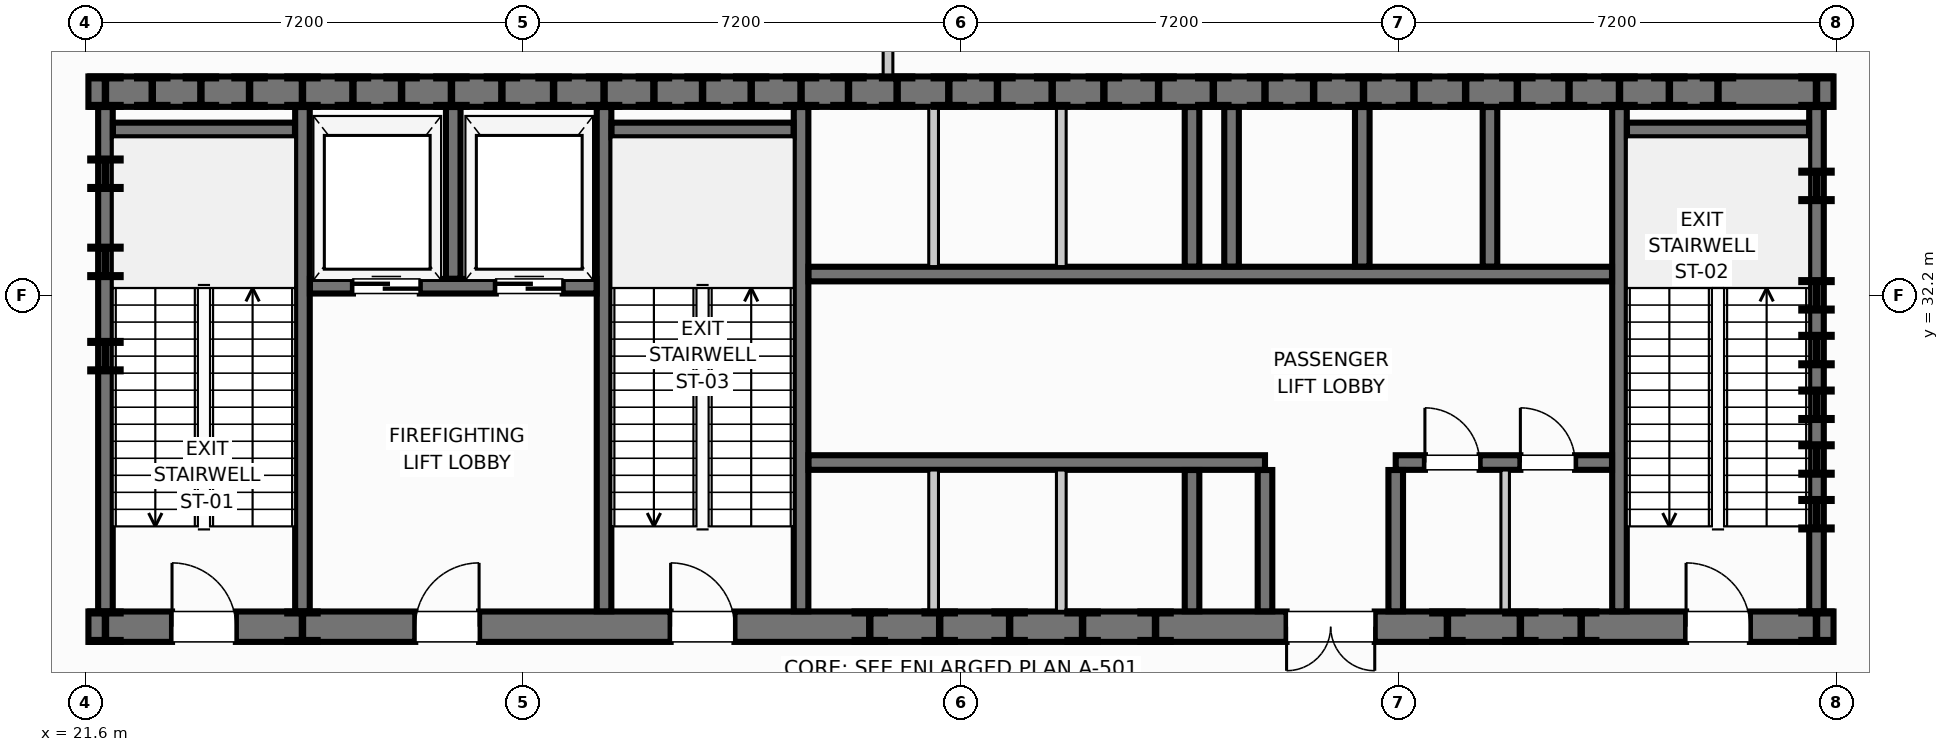
"""IFC4 building model, lengths in metres.
Left out: names, types, materials, properties, quantities, classifications, styles, units other than length and angle.
Written with IfcOpenShell. Run it as: python <this file> out.ifc"""

import sys

from ifc_helpers import new_model, si_unit, direction, frame, frame_2d, origin, origin_2d, place, context, subcontext, project, spatial, rectangle, i_section, extrude, element, fill, save


model = new_model("IFC4")
c1 = context("Model", 3, precision=1e-05, world=origin(), true_north=direction((0.0, 1.0)))
c2 = subcontext(c1, "Body", "Model", "MODEL_VIEW")
j1 = project(units=[si_unit("LENGTHUNIT", "METRE"), si_unit("PLANEANGLEUNIT", "RADIAN")], contexts=[c1])
p1 = place(None, origin())
s1 = spatial("IfcSite", under=j1, at=p1, CompositionType="ELEMENT")
p2 = place(p1, origin())
s2 = spatial("IfcBuilding", under=s1, at=p2, CompositionType="ELEMENT")
p3 = place(p2, frame((0.0, 0.0, -5.4)))
s3 = spatial("IfcBuildingStorey", under=s2, at=p3, CompositionType="ELEMENT", Elevation=-5.4)
for number, where, z_axis, x_axis in (
    (1, (21.93, 35.55, 0.0), (0.0, 0.0, 1.0), (1.0, 0.0, 0.0)),
    (2, (23.5, 35.55, 0.0), (0.0, 0.0, 1.0), (1.0, 0.0, 0.0)),
    (3, (25.17, 35.55, 0.0), (0.0, 0.0, 1.0), (1.0, 0.0, 0.0)),
    (4, (26.8, 35.55, 0.0), (0.0, 0.0, 1.0), (1.0, 0.0, 0.0)),
    (5, (28.45, 35.55, 0.0), (0.0, 0.0, 1.0), (1.0, 0.0, 0.0)),
    (6, (30.13, 35.55, 0.0), (0.0, 0.0, 1.0), (1.0, 0.0, 0.0)),
    (7, (31.75, 35.55, 0.0), (0.0, 0.0, 1.0), (1.0, 0.0, 0.0)),
    (8, (33.37, 35.55, 0.0), (0.0, 0.0, 1.0), (1.0, 0.0, 0.0)),
    (9, (34.95, 35.55, 0.0), (0.0, 0.0, 1.0), (1.0, 0.0, 0.0)),
    (10, (36.6, 35.55, 0.0), (0.0, 0.0, 1.0), (1.0, 0.0, 0.0)),
    (11, (38.35, 35.55, 0.0), (0.0, 0.0, 1.0), (1.0, 0.0, 0.0)),
    (12, (40.15, 35.55, 0.0), (0.0, 0.0, 1.0), (1.0, 0.0, 0.0)),
    (13, (41.8, 35.55, 0.0), (0.0, 0.0, 1.0), (1.0, 0.0, 0.0)),
    (14, (43.45, 35.55, 0.0), (0.0, 0.0, 1.0), (1.0, 0.0, 0.0)),
    (15, (45.15, 35.55, 0.0), (0.0, 0.0, 1.0), (1.0, 0.0, 0.0)),
    (16, (46.83, 35.55, 0.0), (0.0, 0.0, 1.0), (1.0, 0.0, 0.0)),
    (17, (48.45, 35.55, 0.0), (0.0, 0.0, 1.0), (1.0, 0.0, 0.0)),
    (18, (50.07, 35.55, 0.0), (0.0, 0.0, 1.0), (1.0, 0.0, 0.0)),
    (19, (21.93, 26.75, 0.0), (0.0, 0.0, 1.0), (1.0, 0.0, 0.0)),
    (20, (25.17, 26.75, 0.0), (0.0, 0.0, 1.0), (1.0, 0.0, 0.0)),
    (21, (34.5, 26.75, 0.0), (0.0, 0.0, 1.0), (1.0, 0.0, 0.0)),
    (22, (36.8, 26.75, 0.0), (0.0, 0.0, 1.0), (1.0, 0.0, 0.0)),
    (23, (39.2, 26.75, 0.0), (0.0, 0.0, 1.0), (1.0, 0.0, 0.0)),
    (24, (45.2, 26.75, 0.0), (0.0, 0.0, 1.0), (1.0, 0.0, 0.0)),
    (25, (50.07, 26.75, 0.0), (0.0, 0.0, 1.0), (1.0, 0.0, 0.0)),
    (26, (21.93, 31.2, 0.0), (0.0, 0.0, 1.0), (1.0, 0.0, 0.0)),
    (27, (21.93, 32.75, 0.0), (0.0, 0.0, 1.0), (1.0, 0.0, 0.0)),
    (28, (21.93, 34.2, 0.0), (0.0, 0.0, 1.0), (1.0, 0.0, 0.0)),
    (29, (50.07, 28.6, 0.0), (0.0, 0.0, 1.0), (1.0, 0.0, 0.0)),
    (30, (50.07, 30.4, 0.0), (0.0, 0.0, 1.0), (1.0, 0.0, 0.0)),
    (31, (50.07, 32.2, 0.0), (0.0, 0.0, 1.0), (1.0, 0.0, 0.0)),
    (32, (50.07, 34.0, 0.0), (0.0, 0.0, 1.0), (1.0, 0.0, 0.0)),
    (33, (22.7, 35.55, 0.0), (0.0, 0.0, 1.0), (1.0, 0.0, 0.0)),
    (34, (27.62, 35.55, 0.0), (0.0, 0.0, 1.0), (1.0, 0.0, 0.0)),
    (35, (32.55, 35.55, 0.0), (0.0, 0.0, 1.0), (1.0, 0.0, 0.0)),
    (36, (37.5, 35.55, 0.0), (0.0, 0.0, 1.0), (1.0, 0.0, 0.0)),
    (37, (42.62, 35.55, 0.0), (0.0, 0.0, 1.0), (1.0, 0.0, 0.0)),
    (38, (47.65, 35.55, 0.0), (0.0, 0.0, 1.0), (1.0, 0.0, 0.0)),
    (39, (24.3, 35.55, 0.0), (0.0, 0.0, 1.0), (1.0, 0.0, 0.0)),
    (40, (26.0, 35.55, 0.0), (0.0, 0.0, 1.0), (1.0, 0.0, 0.0)),
    (41, (29.3, 35.55, 0.0), (0.0, 0.0, 1.0), (1.0, 0.0, 0.0)),
    (42, (30.95, 35.55, 0.0), (0.0, 0.0, 1.0), (1.0, 0.0, 0.0)),
    (43, (34.15, 35.55, 0.0), (0.0, 0.0, 1.0), (1.0, 0.0, 0.0)),
    (44, (35.8, 35.55, 0.0), (0.0, 0.0, 1.0), (1.0, 0.0, 0.0)),
    (45, (39.25, 35.55, 0.0), (0.0, 0.0, 1.0), (1.0, 0.0, 0.0)),
    (46, (41.0, 35.55, 0.0), (0.0, 0.0, 1.0), (1.0, 0.0, 0.0)),
    (47, (44.3, 35.55, 0.0), (0.0, 0.0, 1.0), (1.0, 0.0, 0.0)),
    (48, (46.0, 35.55, 0.0), (0.0, 0.0, 1.0), (1.0, 0.0, 0.0)),
    (49, (50.07, 29.5, 0.0), (0.0, 0.0, 1.0), (1.0, 0.0, 0.0)),
    (50, (50.07, 31.3, 0.0), (0.0, 0.0, 1.0), (1.0, 0.0, 0.0)),
    (51, (35.65, 26.75, 0.0), (0.0, 0.0, 1.0), (1.0, 0.0, 0.0)),
    (52, (38.0, 26.75, 0.0), (0.0, 0.0, 1.0), (1.0, 0.0, 0.0)),
    (53, (44.0, 26.75, 0.0), (0.0, 0.0, 1.0), (1.0, 0.0, 0.0)),
    (54, (46.2, 26.75, 0.0), (0.0, 0.0, 1.0), (1.0, 0.0, 0.0)),
):
    element("IfcColumn", number, at=place(p3, frame(where, z_axis=z_axis, x_axis=x_axis)), inside=s3, PredefinedType="COLUMN", context=c2, shape_type="SweptSolid", body=[
        extrude(i_section(OverallWidth=0.5, OverallDepth=0.5, WebThickness=0.022, FlangeThickness=0.032, at=origin_2d()), origin(), (0.0, 0.0, 1.0), 5.4),
    ])
p4 = place(p3, frame((21.65, 26.75, 0.0), z_axis=(0.0, 0.0, 1.0), x_axis=(1.0, 0.0, 0.0)))
e55 = element("IfcWall", 55, at=p4, inside=s3, PredefinedType="SHEAR", context=c2, shape_type="SweptSolid", body=[
    extrude(rectangle(XDim=28.7, YDim=0.5, at=frame_2d((14.35, 0.0))), origin(), (0.0, 0.0, 1.0), 5.4),
])
p5 = place(p4, frame((1.375, 0.0, 0.0)))
e56 = element("IfcOpeningElement", 56, at=p5, cuts=e55, PredefinedType="OPENING", context=c2, shape_type="SweptSolid", body=[
    extrude(rectangle(XDim=1.05, YDim=2.0, at=frame_2d((0.525, 1.0))), frame((0.0, 0.26, 0.0), z_axis=(0.0, -1.0, 0.0), x_axis=(1.0, 0.0, 0.0)), (0.0, 0.0, 1.0), 0.52),
])
p6 = place(p4, frame((5.375, 0.0, 0.0)))
e57 = element("IfcOpeningElement", 57, at=p6, cuts=e55, PredefinedType="OPENING", context=c2, shape_type="SweptSolid", body=[
    extrude(rectangle(XDim=1.05, YDim=2.0, at=frame_2d((0.525, 1.0))), frame((0.0, 0.26, 0.0), z_axis=(0.0, -1.0, 0.0), x_axis=(1.0, 0.0, 0.0)), (0.0, 0.0, 1.0), 0.52),
])
p7 = place(p4, frame((9.575, 0.0, 0.0)))
e58 = element("IfcOpeningElement", 58, at=p7, cuts=e55, PredefinedType="OPENING", context=c2, shape_type="SweptSolid", body=[
    extrude(rectangle(XDim=1.05, YDim=2.0, at=frame_2d((0.525, 1.0))), frame((0.0, 0.26, 0.0), z_axis=(0.0, -1.0, 0.0), x_axis=(1.0, 0.0, 0.0)), (0.0, 0.0, 1.0), 0.52),
])
p8 = place(p4, frame((19.705, 0.0, 0.0)))
e59 = element("IfcOpeningElement", 59, at=p8, cuts=e55, PredefinedType="OPENING", context=c2, shape_type="SweptSolid", body=[
    extrude(rectangle(XDim=1.45, YDim=2.0, at=frame_2d((0.725, 1.0))), frame((0.0, 0.26, 0.0), z_axis=(0.0, -1.0, 0.0), x_axis=(1.0, 0.0, 0.0)), (0.0, 0.0, 1.0), 0.52),
])
p9 = place(p4, frame((26.275, 0.0, 0.0)))
e60 = element("IfcOpeningElement", 60, at=p9, cuts=e55, PredefinedType="OPENING", context=c2, shape_type="SweptSolid", body=[
    extrude(rectangle(XDim=1.05, YDim=2.0, at=frame_2d((0.525, 1.0))), frame((0.0, 0.26, 0.0), z_axis=(0.0, -1.0, 0.0), x_axis=(1.0, 0.0, 0.0)), (0.0, 0.0, 1.0), 0.52),
])
p10 = place(p3, frame((50.35, 35.55, 0.0), z_axis=(0.0, 0.0, 1.0), x_axis=(-1.0, 0.0, 0.0)))
e61 = element("IfcWall", 61, at=p10, inside=s3, PredefinedType="SHEAR", context=c2, shape_type="SweptSolid", body=[
    extrude(rectangle(XDim=28.7, YDim=0.5, at=frame_2d((14.35, 0.0))), origin(), (0.0, 0.0, 1.0), 5.4),
])
for number, where, z_axis, x_axis in (
    (62, (21.93, 35.297, 0.0), (0.0, 0.0, 1.0), (0.0, -1.0, 0.0)),
    (63, (50.07, 27.003, 0.0), (0.0, 0.0, 1.0), (0.0, 1.0, 0.0)),
    (64, (25.17, 27.003, 0.0), (0.0, 0.0, 1.0), (0.0, 1.0, 0.0)),
):
    element("IfcWall", number, at=place(p3, frame(where, z_axis=z_axis, x_axis=x_axis)), inside=s3, PredefinedType="SHEAR", context=c2, shape_type="SweptSolid", body=[
        extrude(rectangle(XDim=8.294, YDim=0.24, at=frame_2d((4.147, 0.0))), origin(), (0.0, 0.0, 1.0), 5.4),
    ])
p11 = place(p3, frame((22.053, 34.92, 0.0), z_axis=(0.0, 0.0, 1.0), x_axis=(1.0, 0.0, 0.0)))
e65 = element("IfcWall", 65, at=p11, inside=s3, PredefinedType="SHEAR", context=c2, shape_type="SweptSolid", body=[
    extrude(rectangle(XDim=2.994, YDim=0.24, at=frame_2d((1.497, 0.0))), origin(), (0.0, 0.0, 1.0), 5.4),
])
for number, where, z_axis, x_axis in (
    (66, (30.13, 27.003, 0.0), (0.0, 0.0, 1.0), (0.0, 1.0, 0.0)),
    (67, (33.37, 27.003, 0.0), (0.0, 0.0, 1.0), (0.0, 1.0, 0.0)),
):
    element("IfcWall", number, at=place(p3, frame(where, z_axis=z_axis, x_axis=x_axis)), inside=s3, PredefinedType="SHEAR", context=c2, shape_type="SweptSolid", body=[
        extrude(rectangle(XDim=8.294, YDim=0.24, at=frame_2d((4.147, 0.0))), origin(), (0.0, 0.0, 1.0), 5.4),
    ])
p12 = place(p3, frame((30.253, 34.92, 0.0), z_axis=(0.0, 0.0, 1.0), x_axis=(1.0, 0.0, 0.0)))
e68 = element("IfcWall", 68, at=p12, inside=s3, PredefinedType="SHEAR", context=c2, shape_type="SweptSolid", body=[
    extrude(rectangle(XDim=2.994, YDim=0.24, at=frame_2d((1.497, 0.0))), origin(), (0.0, 0.0, 1.0), 5.4),
])
p13 = place(p3, frame((46.83, 27.003, 0.0), z_axis=(0.0, 0.0, 1.0), x_axis=(0.0, 1.0, 0.0)))
e69 = element("IfcWall", 69, at=p13, inside=s3, PredefinedType="SHEAR", context=c2, shape_type="SweptSolid", body=[
    extrude(rectangle(XDim=8.294, YDim=0.24, at=frame_2d((4.147, 0.0))), origin(), (0.0, 0.0, 1.0), 5.4),
])
p14 = place(p3, frame((46.953, 34.92, 0.0), z_axis=(0.0, 0.0, 1.0), x_axis=(1.0, 0.0, 0.0)))
e70 = element("IfcWall", 70, at=p14, inside=s3, PredefinedType="SHEAR", context=c2, shape_type="SweptSolid", body=[
    extrude(rectangle(XDim=2.994, YDim=0.24, at=frame_2d((1.497, 0.0))), origin(), (0.0, 0.0, 1.0), 5.4),
])
p15 = place(p3, frame((25.293, 32.35, 0.0), z_axis=(0.0, 0.0, 1.0), x_axis=(1.0, 0.0, 0.0)))
e71 = element("IfcWall", 71, at=p15, inside=s3, PredefinedType="SHEAR", context=c2, shape_type="SweptSolid", body=[
    extrude(rectangle(XDim=4.714, YDim=0.24, at=frame_2d((2.357, 0.0))), origin(), (0.0, 0.0, 1.0), 5.4),
])
p16 = place(p15, frame((0.707, 0.0, 0.0)))
e72 = element("IfcOpeningElement", 72, at=p16, cuts=e71, PredefinedType="OPENING", context=c2, shape_type="SweptSolid", body=[
    extrude(rectangle(XDim=1.1, YDim=2.0, at=frame_2d((0.55, 1.0))), frame((0.0, 0.13, 0.0), z_axis=(0.0, -1.0, 0.0), x_axis=(1.0, 0.0, 0.0)), (0.0, 0.0, 1.0), 0.26),
])
p17 = place(p15, frame((3.057, 0.0, 0.0)))
e73 = element("IfcOpeningElement", 73, at=p17, cuts=e71, PredefinedType="OPENING", context=c2, shape_type="SweptSolid", body=[
    extrude(rectangle(XDim=1.1, YDim=2.0, at=frame_2d((0.55, 1.0))), frame((0.0, 0.13, 0.0), z_axis=(0.0, -1.0, 0.0), x_axis=(1.0, 0.0, 0.0)), (0.0, 0.0, 1.0), 0.26),
])
p18 = place(p3, frame((27.65, 32.473, 0.0), z_axis=(0.0, 0.0, 1.0), x_axis=(0.0, 1.0, 0.0)))
e74 = element("IfcWall", 74, at=p18, inside=s3, PredefinedType="SHEAR", context=c2, shape_type="SweptSolid", body=[
    extrude(rectangle(XDim=2.824, YDim=0.24, at=frame_2d((1.412, 0.0))), origin(), (0.0, 0.0, 1.0), 5.4),
])
p19 = place(p3, frame((33.493, 32.55, 0.0), z_axis=(0.0, 0.0, 1.0), x_axis=(1.0, 0.0, 0.0)))
e75 = element("IfcWall", 75, at=p19, inside=s3, PredefinedType="SHEAR", context=c2, shape_type="SweptSolid", body=[
    extrude(rectangle(XDim=13.214, YDim=0.24, at=frame_2d((6.607, 0.0))), origin(), (0.0, 0.0, 1.0), 5.4),
])
p20 = place(p3, frame((33.493, 29.45, 0.0), z_axis=(0.0, 0.0, 1.0), x_axis=(1.0, 0.0, 0.0)))
e76 = element("IfcWall", 76, at=p20, inside=s3, PredefinedType="SHEAR", context=c2, shape_type="SweptSolid", body=[
    extrude(rectangle(XDim=7.507, YDim=0.24, at=frame_2d((3.753, 0.0))), origin(), (0.0, 0.0, 1.0), 5.4),
])
p21 = place(p3, frame((43.15, 29.45, 0.0), z_axis=(0.0, 0.0, 1.0), x_axis=(1.0, 0.0, 0.0)))
e77 = element("IfcWall", 77, at=p21, inside=s3, PredefinedType="SHEAR", context=c2, shape_type="SweptSolid", body=[
    extrude(rectangle(XDim=3.557, YDim=0.24, at=frame_2d((1.779, 0.0))), origin(), (0.0, 0.0, 1.0), 5.4),
])
p22 = place(p21, frame((0.48, 0.0, 0.0)))
e78 = element("IfcOpeningElement", 78, at=p22, cuts=e77, PredefinedType="OPENING", context=c2, shape_type="SweptSolid", body=[
    extrude(rectangle(XDim=0.9, YDim=2.0, at=frame_2d((0.45, 1.0))), frame((0.0, 0.13, 0.0), z_axis=(0.0, -1.0, 0.0), x_axis=(1.0, 0.0, 0.0)), (0.0, 0.0, 1.0), 0.26),
])
p23 = place(p21, frame((2.05, 0.0, 0.0)))
e79 = element("IfcOpeningElement", 79, at=p23, cuts=e77, PredefinedType="OPENING", context=c2, shape_type="SweptSolid", body=[
    extrude(rectangle(XDim=0.9, YDim=2.0, at=frame_2d((0.45, 1.0))), frame((0.0, 0.13, 0.0), z_axis=(0.0, -1.0, 0.0), x_axis=(1.0, 0.0, 0.0)), (0.0, 0.0, 1.0), 0.26),
])
for number, where, z_axis, x_axis in (
    (80, (41.0, 27.003, 0.0), (0.0, 0.0, 1.0), (0.0, 1.0, 0.0)),
    (81, (43.15, 27.003, 0.0), (0.0, 0.0, 1.0), (0.0, 1.0, 0.0)),
):
    element("IfcWall", number, at=place(p3, frame(where, z_axis=z_axis, x_axis=x_axis)), inside=s3, PredefinedType="SHEAR", context=c2, shape_type="SweptSolid", body=[
        extrude(rectangle(XDim=2.324, YDim=0.24, at=frame_2d((1.162, 0.0))), origin(), (0.0, 0.0, 1.0), 5.4),
    ])
for number, where, z_axis, x_axis in (
    (82, (39.8, 32.673, 0.0), (0.0, 0.0, 1.0), (0.0, 1.0, 0.0)),
    (83, (40.45, 32.673, 0.0), (0.0, 0.0, 1.0), (0.0, 1.0, 0.0)),
    (84, (42.6, 32.673, 0.0), (0.0, 0.0, 1.0), (0.0, 1.0, 0.0)),
    (85, (44.7, 32.673, 0.0), (0.0, 0.0, 1.0), (0.0, 1.0, 0.0)),
):
    element("IfcWall", number, at=place(p3, frame(where, z_axis=z_axis, x_axis=x_axis)), inside=s3, PredefinedType="SHEAR", context=c2, shape_type="SweptSolid", body=[
        extrude(rectangle(XDim=2.624, YDim=0.24, at=frame_2d((1.312, 0.0))), origin(), (0.0, 0.0, 1.0), 5.4),
    ])
p24 = place(p3, frame((39.8, 27.003, 0.0), z_axis=(0.0, 0.0, 1.0), x_axis=(0.0, 1.0, 0.0)))
e86 = element("IfcWall", 86, at=p24, inside=s3, PredefinedType="SHEAR", context=c2, shape_type="SweptSolid", body=[
    extrude(rectangle(XDim=2.324, YDim=0.24, at=frame_2d((1.162, 0.0))), origin(), (0.0, 0.0, 1.0), 5.4),
])
for number, where, z_axis, x_axis in (
    (87, (35.55, 32.673, 0.0), (0.0, 0.0, 1.0), (0.0, 1.0, 0.0)),
    (88, (37.65, 32.673, 0.0), (0.0, 0.0, 1.0), (0.0, 1.0, 0.0)),
):
    element("IfcWall", number, at=place(p3, frame(where, z_axis=z_axis, x_axis=x_axis)), inside=s3, PredefinedType="MOVABLE", context=c2, shape_type="SweptSolid", body=[
        extrude(rectangle(XDim=2.624, YDim=0.16, at=frame_2d((1.312, 0.0))), origin(), (0.0, 0.0, 1.0), 5.085),
    ])
for number, where, z_axis, x_axis in (
    (89, (35.55, 27.003, 0.0), (0.0, 0.0, 1.0), (0.0, 1.0, 0.0)),
    (90, (37.65, 27.003, 0.0), (0.0, 0.0, 1.0), (0.0, 1.0, 0.0)),
):
    element("IfcWall", number, at=place(p3, frame(where, z_axis=z_axis, x_axis=x_axis)), inside=s3, PredefinedType="MOVABLE", context=c2, shape_type="SweptSolid", body=[
        extrude(rectangle(XDim=2.324, YDim=0.16, at=frame_2d((1.162, 0.0))), origin(), (0.0, 0.0, 1.0), 5.085),
    ])
p25 = place(p3, frame((44.95, 27.003, 0.0), z_axis=(0.0, 0.0, 1.0), x_axis=(0.0, 1.0, 0.0)))
e91 = element("IfcWall", 91, at=p25, inside=s3, PredefinedType="PARTITIONING", context=c2, shape_type="SweptSolid", body=[
    extrude(rectangle(XDim=2.324, YDim=0.14, at=frame_2d((1.162, 0.0))), origin(), (0.0, 0.0, 1.0), 5.085),
])
p26 = place(p3, frame((34.8, 35.803, 0.0), z_axis=(0.0, 0.0, 1.0), x_axis=(0.0, 1.0, 0.0)))
e92 = element("IfcWall", 92, at=p26, inside=s3, PredefinedType="PARTITIONING", context=c2, shape_type="SweptSolid", body=[
    extrude(rectangle(XDim=2.197, YDim=0.16, at=frame_2d((1.099, 0.0))), origin(), (0.0, 0.0, 1.0), 5.085),
])
p27 = place(p22, origin())
e93 = element("IfcDoor", 93, at=p27, inside=s3, OperationType="SINGLE_SWING_LEFT", PredefinedType="DOOR", context=c2, shape_type="SweptSolid", body=[
    extrude(rectangle(XDim=0.9, YDim=2.0, at=frame_2d((0.45, 1.0))), frame((0.0, 0.025, 0.0), z_axis=(0.0, -1.0, 0.0), x_axis=(1.0, 0.0, 0.0)), (0.0, 0.0, 1.0), 0.05),
])
fill(e78, e93)
p28 = place(p23, origin())
e94 = element("IfcDoor", 94, at=p28, inside=s3, OperationType="SINGLE_SWING_LEFT", PredefinedType="DOOR", context=c2, shape_type="SweptSolid", body=[
    extrude(rectangle(XDim=0.9, YDim=2.0, at=frame_2d((0.45, 1.0))), frame((0.0, 0.025, 0.0), z_axis=(0.0, -1.0, 0.0), x_axis=(1.0, 0.0, 0.0)), (0.0, 0.0, 1.0), 0.05),
])
fill(e79, e94)
p29 = place(p5, origin())
e95 = element("IfcDoor", 95, at=p29, inside=s3, OperationType="SINGLE_SWING_LEFT", PredefinedType="DOOR", context=c2, shape_type="SweptSolid", body=[
    extrude(rectangle(XDim=1.05, YDim=2.0, at=frame_2d((0.525, 1.0))), frame((0.0, 0.025, 0.0), z_axis=(0.0, -1.0, 0.0), x_axis=(1.0, 0.0, 0.0)), (0.0, 0.0, 1.0), 0.05),
])
fill(e56, e95)
p30 = place(p6, origin())
e96 = element("IfcDoor", 96, at=p30, inside=s3, OperationType="SINGLE_SWING_RIGHT", PredefinedType="DOOR", context=c2, shape_type="SweptSolid", body=[
    extrude(rectangle(XDim=1.05, YDim=2.0, at=frame_2d((0.525, 1.0))), frame((0.0, 0.025, 0.0), z_axis=(0.0, -1.0, 0.0), x_axis=(1.0, 0.0, 0.0)), (0.0, 0.0, 1.0), 0.05),
])
fill(e57, e96)
p31 = place(p7, origin())
e97 = element("IfcDoor", 97, at=p31, inside=s3, OperationType="SINGLE_SWING_LEFT", PredefinedType="DOOR", context=c2, shape_type="SweptSolid", body=[
    extrude(rectangle(XDim=1.05, YDim=2.0, at=frame_2d((0.525, 1.0))), frame((0.0, 0.025, 0.0), z_axis=(0.0, -1.0, 0.0), x_axis=(1.0, 0.0, 0.0)), (0.0, 0.0, 1.0), 0.05),
])
fill(e58, e97)
p32 = place(p8, frame((1.45, 0.0, 0.0), z_axis=(0.0, 0.0, 1.0), x_axis=(-1.0, 0.0, 0.0)))
e98 = element("IfcDoor", 98, at=p32, inside=s3, OperationType="DOUBLE_DOOR_SINGLE_SWING", PredefinedType="DOOR", context=c2, shape_type="SweptSolid", body=[
    extrude(rectangle(XDim=1.45, YDim=2.0, at=frame_2d((0.725, 1.0))), frame((0.0, 0.025, 0.0), z_axis=(0.0, -1.0, 0.0), x_axis=(1.0, 0.0, 0.0)), (0.0, 0.0, 1.0), 0.05),
])
fill(e59, e98)
p33 = place(p9, origin())
e99 = element("IfcDoor", 99, at=p33, inside=s3, OperationType="SINGLE_SWING_LEFT", PredefinedType="DOOR", context=c2, shape_type="SweptSolid", body=[
    extrude(rectangle(XDim=1.05, YDim=2.0, at=frame_2d((0.525, 1.0))), frame((0.0, 0.025, 0.0), z_axis=(0.0, -1.0, 0.0), x_axis=(1.0, 0.0, 0.0)), (0.0, 0.0, 1.0), 0.05),
])
fill(e60, e99)
p34 = place(p16, origin())
e100 = element("IfcDoor", 100, at=p34, inside=s3, OperationType="DOUBLE_DOOR_SLIDING", PredefinedType="USERDEFINED", context=c2, shape_type="SweptSolid", body=[
    extrude(rectangle(XDim=1.1, YDim=2.0, at=frame_2d((0.55, 1.0))), frame((0.0, 0.025, 0.0), z_axis=(0.0, -1.0, 0.0), x_axis=(1.0, 0.0, 0.0)), (0.0, 0.0, 1.0), 0.05),
])
fill(e72, e100)
p35 = place(p17, origin())
e101 = element("IfcDoor", 101, at=p35, inside=s3, OperationType="DOUBLE_DOOR_SLIDING", PredefinedType="USERDEFINED", context=c2, shape_type="SweptSolid", body=[
    extrude(rectangle(XDim=1.1, YDim=2.0, at=frame_2d((0.55, 1.0))), frame((0.0, 0.025, 0.0), z_axis=(0.0, -1.0, 0.0), x_axis=(1.0, 0.0, 0.0)), (0.0, 0.0, 1.0), 0.05),
])
fill(e73, e101)
save(model, sys.argv[1])
